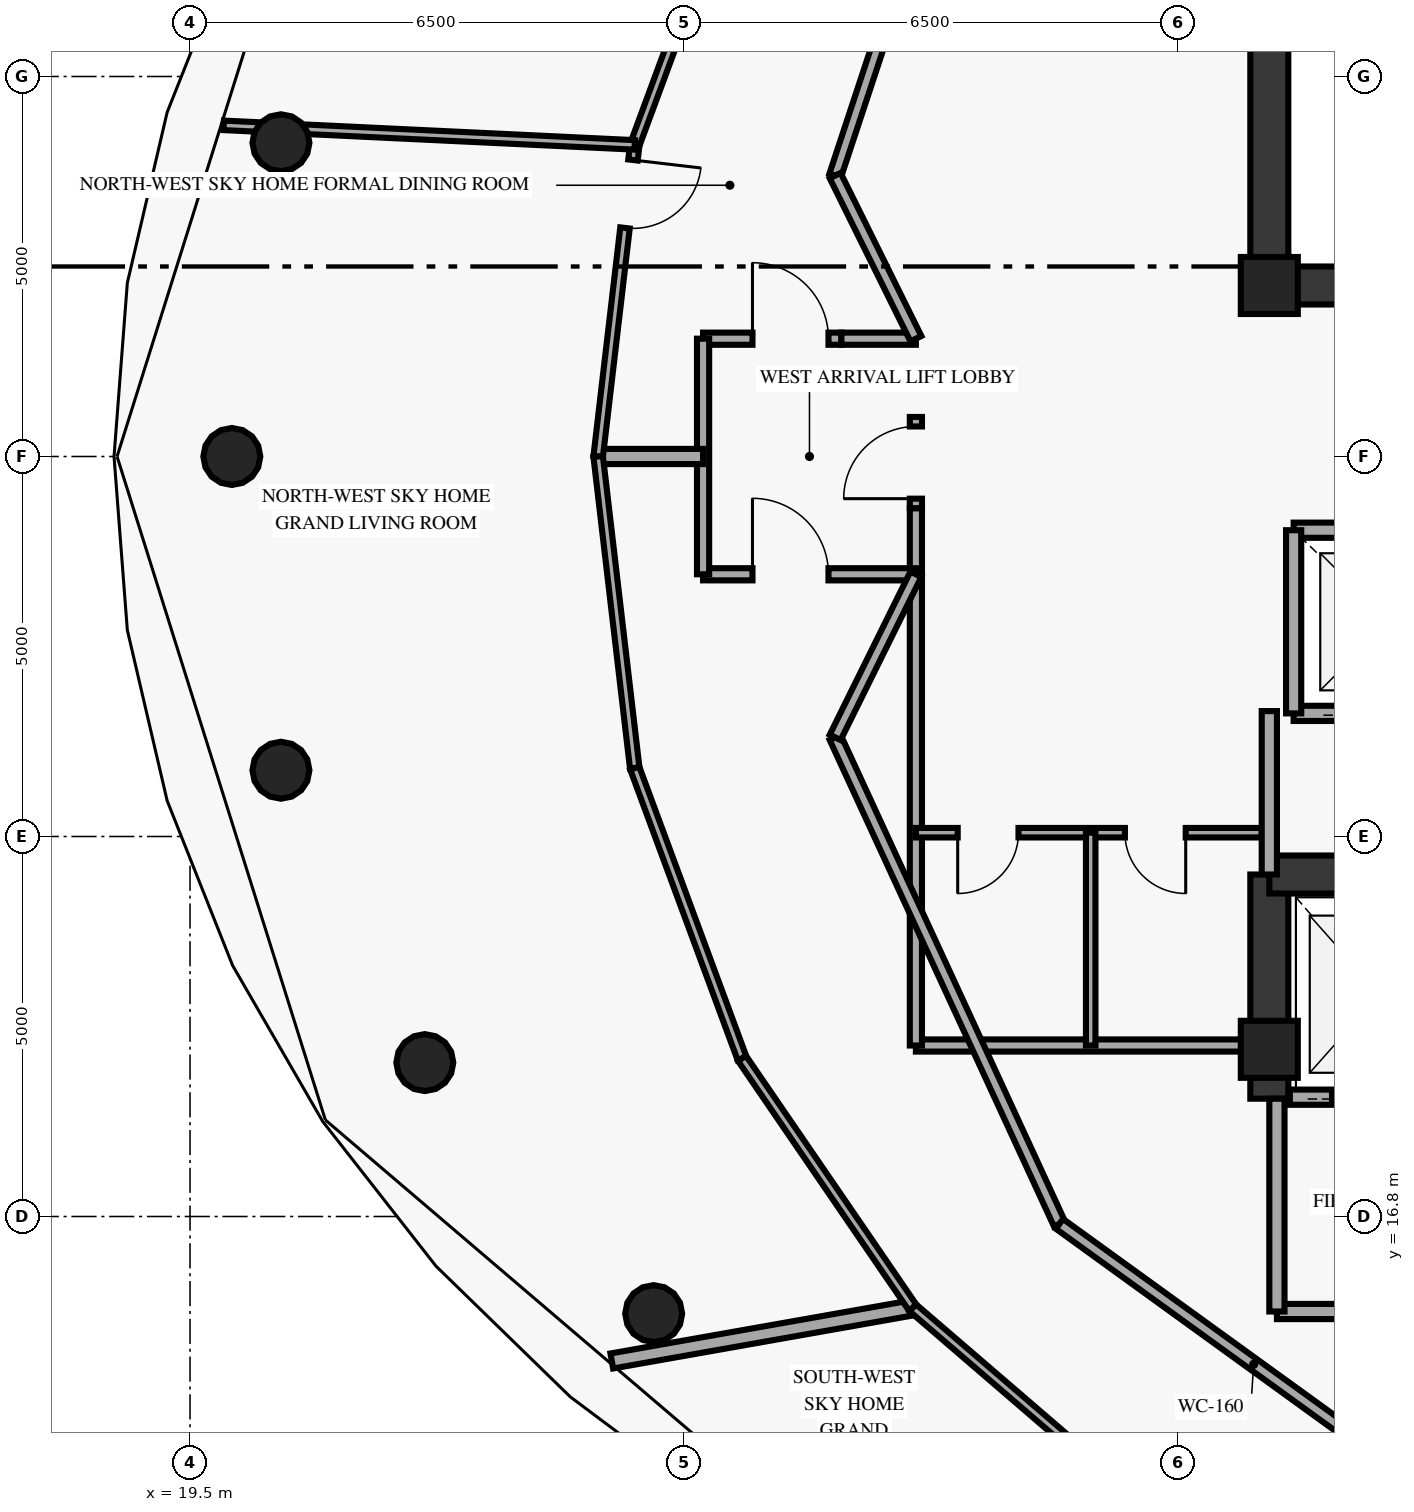
"""IFC4 building model, lengths in metres.
Left out: names, types, materials, properties, quantities, classifications, styles, units other than length and angle.
Written with IfcOpenShell. Run it as: python <this file> out.ifc"""

import sys

from ifc_helpers import new_model, si_unit, direction, frame, frame_2d, origin, origin_2d, place, context, subcontext, project, spatial, rectangle, circle, extrude, element, fill, save


model = new_model("IFC4")
c1 = context("Model", 3, precision=1e-05, world=origin(), true_north=direction((0.0, 1.0)))
c2 = subcontext(c1, "Body", "Model", "MODEL_VIEW")
j1 = project(units=[si_unit("LENGTHUNIT", "METRE"), si_unit("PLANEANGLEUNIT", "RADIAN")], contexts=[c1])
p1 = place(None, origin())
s1 = spatial("IfcSite", under=j1, at=p1, CompositionType="ELEMENT")
p2 = place(p1, origin())
s2 = spatial("IfcBuilding", under=s1, at=p2, CompositionType="ELEMENT")
p3 = place(p2, frame((0.0, 0.0, 255.6)))
s3 = spatial("IfcBuildingStorey", under=s2, at=p3, CompositionType="ELEMENT", Elevation=255.6)
for number, where, z_axis, x_axis in (
    (1, (33.7, 19.0, 0.0), (0.0, 0.0, 1.0), (1.0, 0.0, 0.0)),
    (2, (33.7, 29.05, 0.0), (0.0, 0.0, 1.0), (1.0, 0.0, 0.0)),
):
    element("IfcColumn", number, at=place(p3, frame(where, z_axis=z_axis, x_axis=x_axis)), inside=s3, PredefinedType="PILASTER", context=c2, shape_type="SweptSolid", body=[
        extrude(rectangle(XDim=0.75, YDim=0.75, at=origin_2d()), origin(), (0.0, 0.0, 1.0), 3.54),
    ])
for number, where, z_axis, x_axis in (
    (3, (20.696, 30.928, 0.0), (0.0, 0.0, 1.0), (1.0, 0.0, 0.0)),
    (4, (20.05, 26.8, 0.0), (0.0, 0.0, 1.0), (1.0, 0.0, 0.0)),
    (5, (20.696, 22.672, 0.0), (0.0, 0.0, 1.0), (1.0, 0.0, 0.0)),
    (6, (22.589, 18.825, 0.0), (0.0, 0.0, 1.0), (1.0, 0.0, 0.0)),
    (7, (25.6, 15.522, 0.0), (0.0, 0.0, 1.0), (1.0, 0.0, 0.0)),
):
    element("IfcColumn", number, at=place(p3, frame(where, z_axis=z_axis, x_axis=x_axis)), inside=s3, PredefinedType="COLUMN", context=c2, shape_type="SweptSolid", body=[
        extrude(circle(Radius=0.375, at=origin_2d()), origin(), (0.0, 0.0, 1.0), 3.54),
    ])
p4 = place(p3, frame((33.7, 29.05, 0.0), z_axis=(0.0, 0.0, 1.0), x_axis=(0.0, 1.0, 0.0)))
e8 = element("IfcWall", 8, at=p4, inside=s3, PredefinedType="SHEAR", context=c2, shape_type="SweptSolid", body=[
    extrude(rectangle(XDim=8.35, YDim=0.5, at=frame_2d((4.175, 0.0))), origin(), (0.0, 0.0, 1.0), 3.54),
])
p5 = place(p3, frame((33.7, 18.35, 0.0), z_axis=(0.0, 0.0, 1.0), x_axis=(0.0, 1.0, 0.0)))
e9 = element("IfcWall", 9, at=p5, inside=s3, PredefinedType="SHEAR", context=c2, shape_type="SweptSolid", body=[
    extrude(rectangle(XDim=2.95, YDim=0.5, at=frame_2d((1.475, 0.0))), origin(), (0.0, 0.0, 1.0), 3.54),
])
p6 = place(p3, frame((33.7, 29.05, 0.0), z_axis=(0.0, 0.0, 1.0), x_axis=(1.0, 0.0, 0.0)))
e10 = element("IfcWall", 10, at=p6, inside=s3, PredefinedType="SHEAR", context=c2, shape_type="SweptSolid", body=[
    extrude(rectangle(XDim=10.6, YDim=0.5, at=frame_2d((5.3, 0.0))), origin(), (0.0, 0.0, 1.0), 3.54),
])
p7 = place(p3, frame((33.7, 21.3, 0.0), z_axis=(0.0, 0.0, 1.0), x_axis=(1.0, 0.0, 0.0)))
e11 = element("IfcWall", 11, at=p7, inside=s3, PredefinedType="SHEAR", context=c2, shape_type="SweptSolid", body=[
    extrude(rectangle(XDim=7.55, YDim=0.5, at=frame_2d((3.775, 0.0))), origin(), (0.0, 0.0, 1.0), 3.54),
])
p8 = place(p3, frame((34.02, 23.42, 0.0), z_axis=(0.0, 0.0, 1.0), x_axis=(1.0, 0.0, 0.0)))
e12 = element("IfcWall", 12, at=p8, inside=s3, PredefinedType="SOLIDWALL", context=c2, shape_type="SweptSolid", body=[
    extrude(rectangle(XDim=2.5, YDim=0.2, at=frame_2d((1.25, 0.0))), origin(), (0.0, 0.0, 1.0), 3.54),
])
p9 = place(p8, frame((0.7, 0.0, 0.0)))
e13 = element("IfcOpeningElement", 13, at=p9, cuts=e12, PredefinedType="OPENING", context=c2, shape_type="SweptSolid", body=[
    extrude(rectangle(XDim=1.1, YDim=2.15, at=frame_2d((0.55, 1.075))), frame((0.0, 0.11, 0.0), z_axis=(0.0, -1.0, 0.0), x_axis=(1.0, 0.0, 0.0)), (0.0, 0.0, 1.0), 0.22),
])
p10 = place(p3, frame((34.02, 25.83, 0.0), z_axis=(0.0, 0.0, 1.0), x_axis=(1.0, 0.0, 0.0)))
e14 = element("IfcWall", 14, at=p10, inside=s3, PredefinedType="SOLIDWALL", context=c2, shape_type="SweptSolid", body=[
    extrude(rectangle(XDim=2.5, YDim=0.2, at=frame_2d((1.25, 0.0))), origin(), (0.0, 0.0, 1.0), 3.54),
])
p11 = place(p3, frame((34.02, 23.42, 0.0), z_axis=(0.0, 0.0, 1.0), x_axis=(0.0, 1.0, 0.0)))
e15 = element("IfcWall", 15, at=p11, inside=s3, PredefinedType="SOLIDWALL", context=c2, shape_type="SweptSolid", body=[
    extrude(rectangle(XDim=2.41, YDim=0.2, at=frame_2d((1.205, 0.0))), origin(), (0.0, 0.0, 1.0), 3.54),
])
p12 = place(p3, frame((33.97, 18.37, 0.0), z_axis=(0.0, 0.0, 1.0), x_axis=(1.0, 0.0, 0.0)))
e16 = element("IfcWall", 16, at=p12, inside=s3, PredefinedType="SOLIDWALL", context=c2, shape_type="SweptSolid", body=[
    extrude(rectangle(XDim=2.36, YDim=0.2, at=frame_2d((1.18, 0.0))), origin(), (0.0, 0.0, 1.0), 3.54),
])
p13 = place(p12, frame((0.555, 0.0, 0.0)))
e17 = element("IfcOpeningElement", 17, at=p13, cuts=e16, PredefinedType="OPENING", context=c2, shape_type="SweptSolid", body=[
    extrude(rectangle(XDim=1.25, YDim=2.2, at=frame_2d((0.625, 1.1))), frame((0.0, 0.11, 0.0), z_axis=(0.0, -1.0, 0.0), x_axis=(1.0, 0.0, 0.0)), (0.0, 0.0, 1.0), 0.22),
])
p14 = place(p3, frame((29.05, 19.05, 0.0), z_axis=(0.0, 0.0, 1.0), x_axis=(1.0, 0.0, 0.0)))
e18 = element("IfcWall", 18, at=p14, inside=s3, PredefinedType="PARTITIONING", context=c2, shape_type="SweptSolid", body=[
    extrude(rectangle(XDim=4.65, YDim=0.16, at=frame_2d((2.325, 0.0))), origin(), (0.0, 0.0, 1.0), 3.54),
])
p15 = place(p3, frame((29.05, 19.05, 0.0), z_axis=(0.0, 0.0, 1.0), x_axis=(0.0, 1.0, 0.0)))
e19 = element("IfcWall", 19, at=p15, inside=s3, PredefinedType="PARTITIONING", context=c2, shape_type="SweptSolid", body=[
    extrude(rectangle(XDim=7.07, YDim=0.16, at=frame_2d((3.535, 0.0))), origin(), (0.0, 0.0, 1.0), 3.54),
])
p16 = place(p3, frame((33.6, 21.85, 0.0), z_axis=(0.0, 0.0, 1.0), x_axis=(-1.0, 0.0, 0.0)))
e20 = element("IfcWall", 20, at=p16, inside=s3, PredefinedType="PARTITIONING", context=c2, shape_type="SweptSolid", body=[
    extrude(rectangle(XDim=4.55, YDim=0.125, at=frame_2d((2.275, 0.0))), origin(), (0.0, 0.0, 1.0), 3.54),
])
p17 = place(p16, frame((3.2, 0.0, 0.0)))
e21 = element("IfcOpeningElement", 21, at=p17, cuts=e20, PredefinedType="OPENING", context=c2, shape_type="SweptSolid", body=[
    extrude(rectangle(XDim=0.8, YDim=2.05, at=frame_2d((0.4, 1.025))), frame((0.0, 0.073, 0.0), z_axis=(0.0, -1.0, 0.0), x_axis=(1.0, 0.0, 0.0)), (0.0, 0.0, 1.0), 0.145),
])
p18 = place(p16, frame((1.0, 0.0, 0.0)))
e22 = element("IfcOpeningElement", 22, at=p18, cuts=e20, PredefinedType="OPENING", context=c2, shape_type="SweptSolid", body=[
    extrude(rectangle(XDim=0.8, YDim=2.05, at=frame_2d((0.4, 1.025))), frame((0.0, 0.073, 0.0), z_axis=(0.0, -1.0, 0.0), x_axis=(1.0, 0.0, 0.0)), (0.0, 0.0, 1.0), 0.145),
])
p19 = place(p3, frame((31.35, 19.05, 0.0), z_axis=(0.0, 0.0, 1.0), x_axis=(0.0, 1.0, 0.0)))
e23 = element("IfcWall", 23, at=p19, inside=s3, PredefinedType="PARTITIONING", context=c2, shape_type="SweptSolid", body=[
    extrude(rectangle(XDim=2.8, YDim=0.125, at=frame_2d((1.4, 0.0))), origin(), (0.0, 0.0, 1.0), 3.54),
])
p20 = place(p3, frame((33.7, 21.3, 0.0), z_axis=(0.0, 0.0, 1.0), x_axis=(0.0, 1.0, 0.0)))
e24 = element("IfcWall", 24, at=p20, inside=s3, PredefinedType="SOLIDWALL", context=c2, shape_type="SweptSolid", body=[
    extrude(rectangle(XDim=2.15, YDim=0.2, at=frame_2d((1.075, 0.0))), origin(), (0.0, 0.0, 1.0), 2.925),
])
p21 = place(p3, frame((33.8, 15.55, 0.0), z_axis=(0.0, 0.0, 1.0), x_axis=(1.0, 0.0, 0.0)))
e25 = element("IfcWall", 25, at=p21, inside=s3, PredefinedType="SOLIDWALL", context=c2, shape_type="SweptSolid", body=[
    extrude(rectangle(XDim=7.55, YDim=0.2, at=frame_2d((3.775, 0.0))), origin(), (0.0, 0.0, 1.0), 3.54),
])
p22 = place(p3, frame((33.8, 15.55, 0.0), z_axis=(0.0, 0.0, 1.0), x_axis=(0.0, 1.0, 0.0)))
e26 = element("IfcWall", 26, at=p22, inside=s3, PredefinedType="SOLIDWALL", context=c2, shape_type="SweptSolid", body=[
    extrude(rectangle(XDim=2.8, YDim=0.2, at=frame_2d((1.4, 0.0))), origin(), (0.0, 0.0, 1.0), 3.54),
])
p23 = place(p3, frame((29.05, 26.12, 0.0), z_axis=(0.0, 0.0, 1.0), x_axis=(0.0, 1.0, 0.0)))
e27 = element("IfcWall", 27, at=p23, inside=s3, PredefinedType="PARTITIONING", context=c2, shape_type="SweptSolid", body=[
    extrude(rectangle(XDim=1.2, YDim=0.16, at=frame_2d((0.6, 0.0))), origin(), (0.0, 0.0, 1.0), 3.54),
])
p24 = place(p23, frame((0.125, 0.0, 0.0)))
e28 = element("IfcOpeningElement", 28, at=p24, cuts=e27, PredefinedType="OPENING", context=c2, shape_type="SweptSolid", body=[
    extrude(rectangle(XDim=0.95, YDim=2.15, at=frame_2d((0.475, 1.075))), frame((0.0, 0.09, 0.0), z_axis=(0.0, -1.0, 0.0), x_axis=(1.0, 0.0, 0.0)), (0.0, 0.0, 1.0), 0.18),
])
p25 = place(p3, frame((29.127, 33.94, 0.0), z_axis=(0.0, 0.0, 1.0), x_axis=(-0.313985571683, -0.949427754374, 0.0)))
e29 = element("IfcWall", 29, at=p25, inside=s3, PredefinedType="PARTITIONING", context=c2, shape_type="SweptSolid", body=[
    extrude(rectangle(XDim=3.627, YDim=0.16, at=frame_2d((1.813, 0.0))), origin(), (0.0, 0.0, 1.0), 3.54),
])
p26 = place(p3, frame((27.988, 23.104, 0.0), z_axis=(0.0, 0.0, 1.0), x_axis=(0.418656179426, -0.908144814128, 0.0)))
e30 = element("IfcWall", 30, at=p26, inside=s3, PredefinedType="PARTITIONING", context=c2, shape_type="SweptSolid", body=[
    extrude(rectangle(XDim=7.049, YDim=0.16, at=frame_2d((3.524, 0.0))), origin(), (0.0, 0.0, 1.0), 3.54),
])
p27 = place(p3, frame((30.939, 16.703, 0.0), z_axis=(0.0, 0.0, 1.0), x_axis=(0.810290119061, -0.586028943784, 0.0)))
e31 = element("IfcWall", 31, at=p27, inside=s3, PredefinedType="PARTITIONING", context=c2, shape_type="SweptSolid", body=[
    extrude(rectangle(XDim=6.306, YDim=0.16, at=frame_2d((3.153, 0.0))), origin(), (0.0, 0.0, 1.0), 3.54),
])
p28 = place(p3, frame((26.25, 28.35, 0.0), z_axis=(0.0, 0.0, 1.0), x_axis=(1.0, 0.0, 0.0)))
e32 = element("IfcWall", 32, at=p28, inside=s3, PredefinedType="PARTITIONING", context=c2, shape_type="SweptSolid", body=[
    extrude(rectangle(XDim=1.82, YDim=0.16, at=frame_2d((0.91, 0.0))), origin(), (0.0, 0.0, 1.0), 3.54),
])
p29 = place(p28, frame((0.65, 0.0, 0.0)))
e33 = element("IfcOpeningElement", 33, at=p29, cuts=e32, PredefinedType="OPENING", context=c2, shape_type="SweptSolid", body=[
    extrude(rectangle(XDim=1.0, YDim=2.15, at=frame_2d((0.5, 1.075))), frame((0.0, 0.09, 0.0), z_axis=(0.0, -1.0, 0.0), x_axis=(1.0, 0.0, 0.0)), (0.0, 0.0, 1.0), 0.18),
])
p30 = place(p3, frame((28.07, 28.35, 0.0), z_axis=(0.0, 0.0, 1.0), x_axis=(1.0, 0.0, 0.0)))
e34 = element("IfcWall", 34, at=p30, inside=s3, PredefinedType="PARTITIONING", context=c2, shape_type="SweptSolid", body=[
    extrude(rectangle(XDim=0.98, YDim=0.16, at=frame_2d((0.49, 0.0))), origin(), (0.0, 0.0, 1.0), 2.68),
])
p31 = place(p3, frame((26.25, 25.25, 0.0), z_axis=(0.0, 0.0, 1.0), x_axis=(1.0, 0.0, 0.0)))
e35 = element("IfcWall", 35, at=p31, inside=s3, PredefinedType="PARTITIONING", context=c2, shape_type="SweptSolid", body=[
    extrude(rectangle(XDim=2.8, YDim=0.16, at=frame_2d((1.4, 0.0))), origin(), (0.0, 0.0, 1.0), 3.54),
])
p32 = place(p31, frame((0.65, 0.0, 0.0)))
e36 = element("IfcOpeningElement", 36, at=p32, cuts=e35, PredefinedType="OPENING", context=c2, shape_type="SweptSolid", body=[
    extrude(rectangle(XDim=1.0, YDim=2.15, at=frame_2d((0.5, 1.075))), frame((0.0, 0.09, 0.0), z_axis=(0.0, -1.0, 0.0), x_axis=(1.0, 0.0, 0.0)), (0.0, 0.0, 1.0), 0.18),
])
p33 = place(p3, frame((26.25, 25.25, 0.0), z_axis=(0.0, 0.0, 1.0), x_axis=(0.0, 1.0, 0.0)))
e37 = element("IfcWall", 37, at=p33, inside=s3, PredefinedType="PARTITIONING", context=c2, shape_type="SweptSolid", body=[
    extrude(rectangle(XDim=3.1, YDim=0.16, at=frame_2d((1.55, 0.0))), origin(), (0.0, 0.0, 1.0), 3.54),
])
for number, where, z_axis, x_axis in (
    (38, (27.988, 30.496, 0.0), (0.0, 0.0, 1.0), (0.444, -0.896, 0.0)),
    (39, (27.988, 23.104, 0.0), (0.0, 0.0, 1.0), (0.444, 0.896, 0.0)),
):
    element("IfcWall", number, at=place(p3, frame(where, z_axis=z_axis, x_axis=x_axis)), inside=s3, PredefinedType="PARTITIONING", context=c2, shape_type="SweptSolid", body=[
        extrude(rectangle(XDim=2.394, YDim=0.16, at=frame_2d((1.197, 0.0))), origin(), (0.0, 0.0, 1.0), 3.54),
    ])
p34 = place(p3, frame((26.25, 26.8, 0.0), z_axis=(0.0, 0.0, 1.0), x_axis=(-1.0, 0.0, 0.0)))
e40 = element("IfcWall", 40, at=p34, inside=s3, PredefinedType="PARTITIONING", context=c2, shape_type="SweptSolid", body=[
    extrude(rectangle(XDim=1.38, YDim=0.2, at=frame_2d((0.69, 0.0))), origin(), (0.0, 0.0, 1.0), 3.54),
])
p35 = place(p3, frame((29.009, 15.599, 0.0), z_axis=(0.0, 0.0, 1.0), x_axis=(-0.984724829426, -0.174117805844, 0.0)))
e41 = element("IfcWall", 41, at=p35, inside=s3, PredefinedType="PARTITIONING", context=c2, shape_type="SweptSolid", body=[
    extrude(rectangle(XDim=4.021, YDim=0.2, at=frame_2d((2.011, 0.0))), origin(), (0.0, 0.0, 1.0), 3.54),
])
p36 = place(p3, frame((25.351, 30.9, 0.0), z_axis=(0.0, 0.0, 1.0), x_axis=(0.346671925992, 0.937986447519, 0.0)))
e42 = element("IfcWall", 42, at=p36, inside=s3, PredefinedType="PARTITIONING", context=c2, shape_type="SweptSolid", body=[
    extrude(rectangle(XDim=4.073, YDim=0.125, at=frame_2d((2.036, 0.0))), origin(), (0.0, 0.0, 1.0), 3.54),
])
p37 = place(p36, frame((1.586, 0.0, 0.0)))
e43 = element("IfcOpeningElement", 43, at=p37, cuts=e42, PredefinedType="OPENING", context=c2, shape_type="SweptSolid", body=[
    extrude(rectangle(XDim=0.9, YDim=2.1, at=frame_2d((0.45, 1.05))), frame((0.0, 0.073, 0.0), z_axis=(0.0, -1.0, 0.0), x_axis=(1.0, 0.0, 0.0)), (0.0, 0.0, 1.0), 0.145),
])
p38 = place(p3, frame((24.87, 26.8, 0.0), z_axis=(0.0, 0.0, 1.0), x_axis=(0.116511816348, 0.993189305546, 0.0)))
e44 = element("IfcWall", 44, at=p38, inside=s3, PredefinedType="PARTITIONING", context=c2, shape_type="SweptSolid", body=[
    extrude(rectangle(XDim=4.128, YDim=0.125, at=frame_2d((2.064, 0.0))), origin(), (0.0, 0.0, 1.0), 3.54),
])
p39 = place(p38, frame((3.028, 0.0, 0.0)))
e45 = element("IfcOpeningElement", 45, at=p39, cuts=e44, PredefinedType="OPENING", context=c2, shape_type="SweptSolid", body=[
    extrude(rectangle(XDim=0.9, YDim=2.1, at=frame_2d((0.45, 1.05))), frame((0.0, 0.073, 0.0), z_axis=(0.0, -1.0, 0.0), x_axis=(1.0, 0.0, 0.0)), (0.0, 0.0, 1.0), 0.145),
])
p40 = place(p3, frame((24.87, 26.8, 0.0), z_axis=(0.0, 0.0, 1.0), x_axis=(0.116504972814, -0.993190108343, 0.0)))
e46 = element("IfcWall", 46, at=p40, inside=s3, PredefinedType="PARTITIONING", context=c2, shape_type="SweptSolid", body=[
    extrude(rectangle(XDim=4.128, YDim=0.125, at=frame_2d((2.064, 0.0))), origin(), (0.0, 0.0, 1.0), 3.54),
])
p41 = place(p3, frame((25.351, 22.7, 0.0), z_axis=(0.0, 0.0, 1.0), x_axis=(0.346671925992, -0.937986447519, 0.0)))
e47 = element("IfcWall", 47, at=p41, inside=s3, PredefinedType="PARTITIONING", context=c2, shape_type="SweptSolid", body=[
    extrude(rectangle(XDim=4.073, YDim=0.125, at=frame_2d((2.036, 0.0))), origin(), (0.0, 0.0, 1.0), 3.54),
])
p42 = place(p3, frame((26.763, 18.88, 0.0), z_axis=(0.0, 0.0, 1.0), x_axis=(0.5649172284, -0.825147577744, 0.0)))
e48 = element("IfcWall", 48, at=p42, inside=s3, PredefinedType="PARTITIONING", context=c2, shape_type="SweptSolid", body=[
    extrude(rectangle(XDim=3.976, YDim=0.125, at=frame_2d((1.988, 0.0))), origin(), (0.0, 0.0, 1.0), 3.54),
])
p43 = place(p3, frame((25.351, 30.9, 0.0), z_axis=(0.0, 0.0, 1.0), x_axis=(-0.998872011246, 0.047483735626, 0.0)))
e49 = element("IfcWall", 49, at=p43, inside=s3, PredefinedType="PARTITIONING", context=c2, shape_type="SweptSolid", body=[
    extrude(rectangle(XDim=5.414, YDim=0.125, at=frame_2d((2.707, 0.0))), origin(), (0.0, 0.0, 1.0), 3.54),
])
p44 = place(p3, frame((29.009, 15.599, 0.0), z_axis=(0.0, 0.0, 1.0), x_axis=(0.758094504626, -0.652144709444, 0.0)))
e50 = element("IfcWall", 50, at=p44, inside=s3, PredefinedType="PARTITIONING", context=c2, shape_type="SweptSolid", body=[
    extrude(rectangle(XDim=3.86, YDim=0.125, at=frame_2d((1.93, 0.0))), origin(), (0.0, 0.0, 1.0), 3.54),
])
p45 = place(p13, origin())
e51 = element("IfcDoor", 51, at=p45, inside=s3, OperationType="DOUBLE_DOOR_SLIDING", PredefinedType="DOOR", context=c2, shape_type="SweptSolid", body=[
    extrude(rectangle(XDim=1.25, YDim=2.2, at=frame_2d((0.625, 1.1))), frame((0.0, 0.025, 0.0), z_axis=(0.0, -1.0, 0.0), x_axis=(1.0, 0.0, 0.0)), (0.0, 0.0, 1.0), 0.05),
])
fill(e17, e51)
p46 = place(p17, origin())
e52 = element("IfcDoor", 52, at=p46, inside=s3, OperationType="SINGLE_SWING_RIGHT", PredefinedType="DOOR", context=c2, shape_type="SweptSolid", body=[
    extrude(rectangle(XDim=0.8, YDim=2.05, at=frame_2d((0.4, 1.025))), frame((0.0, 0.025, 0.0), z_axis=(0.0, -1.0, 0.0), x_axis=(1.0, 0.0, 0.0)), (0.0, 0.0, 1.0), 0.05),
])
fill(e21, e52)
p47 = place(p18, origin())
e53 = element("IfcDoor", 53, at=p47, inside=s3, OperationType="SINGLE_SWING_LEFT", PredefinedType="DOOR", context=c2, shape_type="SweptSolid", body=[
    extrude(rectangle(XDim=0.8, YDim=2.05, at=frame_2d((0.4, 1.025))), frame((0.0, 0.025, 0.0), z_axis=(0.0, -1.0, 0.0), x_axis=(1.0, 0.0, 0.0)), (0.0, 0.0, 1.0), 0.05),
])
fill(e22, e53)
p48 = place(p24, origin())
e54 = element("IfcDoor", 54, at=p48, inside=s3, OperationType="SINGLE_SWING_RIGHT", PredefinedType="DOOR", context=c2, shape_type="SweptSolid", body=[
    extrude(rectangle(XDim=0.95, YDim=2.15, at=frame_2d((0.475, 1.075))), frame((0.0, 0.025, 0.0), z_axis=(0.0, -1.0, 0.0), x_axis=(1.0, 0.0, 0.0)), (0.0, 0.0, 1.0), 0.05),
])
fill(e28, e54)
p49 = place(p29, origin())
e55 = element("IfcDoor", 55, at=p49, inside=s3, OperationType="SINGLE_SWING_LEFT", PredefinedType="DOOR", context=c2, shape_type="SweptSolid", body=[
    extrude(rectangle(XDim=1.0, YDim=2.15, at=frame_2d((0.5, 1.075))), frame((0.0, 0.025, 0.0), z_axis=(0.0, -1.0, 0.0), x_axis=(1.0, 0.0, 0.0)), (0.0, 0.0, 1.0), 0.05),
])
fill(e33, e55)
p50 = place(p32, origin())
e56 = element("IfcDoor", 56, at=p50, inside=s3, OperationType="SINGLE_SWING_LEFT", PredefinedType="DOOR", context=c2, shape_type="SweptSolid", body=[
    extrude(rectangle(XDim=1.0, YDim=2.15, at=frame_2d((0.5, 1.075))), frame((0.0, 0.025, 0.0), z_axis=(0.0, -1.0, 0.0), x_axis=(1.0, 0.0, 0.0)), (0.0, 0.0, 1.0), 0.05),
])
fill(e36, e56)
p51 = place(p39, origin())
e57 = element("IfcDoor", 57, at=p51, inside=s3, OperationType="SINGLE_SWING_RIGHT", PredefinedType="DOOR", context=c2, shape_type="SweptSolid", body=[
    extrude(rectangle(XDim=0.9, YDim=2.1, at=frame_2d((0.45, 1.05))), frame((0.0, 0.025, 0.0), z_axis=(0.0, -1.0, 0.0), x_axis=(1.0, 0.0, 0.0)), (0.0, 0.0, 1.0), 0.05),
])
fill(e45, e57)
save(model, sys.argv[1])
